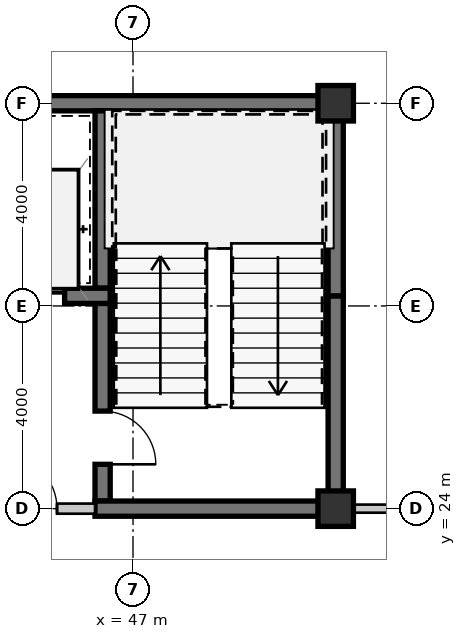
"""IFC4 building model, lengths in metres.
Left out: names, types, materials, properties, quantities, classifications, styles, units other than length and angle.
Written with IfcOpenShell. Run it as: python <this file> out.ifc"""

import sys

from ifc_helpers import new_model, si_unit, direction, frame, frame_2d, origin, origin_2d, place, context, subcontext, project, spatial, rectangle, extrude, source, transform, mapped, element, fill, save


model = new_model("IFC4")
c1 = context("Model", 3, precision=1e-05, world=origin(), true_north=direction((0.0, 1.0)))
c2 = subcontext(c1, "Body", "Model", "MODEL_VIEW")
j1 = project(units=[si_unit("LENGTHUNIT", "METRE"), si_unit("PLANEANGLEUNIT", "RADIAN")], contexts=[c1])
p1 = place(None, origin())
s1 = spatial("IfcSite", under=j1, at=p1, CompositionType="ELEMENT")
p2 = place(p1, origin())
s2 = spatial("IfcBuilding", under=s1, at=p2, CompositionType="ELEMENT")
p3 = place(p2, frame((0.0, 0.0, 74.55)))
s3 = spatial("IfcBuildingStorey", under=s2, at=p3, CompositionType="ELEMENT", Elevation=74.55)
m1 = source(origin(), c2, "Body", "SweptSolid", [
    extrude(rectangle(XDim=0.7, YDim=0.7, at=origin_2d()), origin(), (0.0, 0.0, 1.0), 3.15),
])
for number, where, z_axis, x_axis in (
    (1, (51.0, 24.0, 0.0), (0.0, 0.0, 1.0), (1.0, 0.0, 0.0)),
    (2, (51.0, 32.0, 0.0), (0.0, 0.0, 1.0), (1.0, 0.0, 0.0)),
):
    element("IfcColumn", number, at=place(p3, frame(where, z_axis=z_axis, x_axis=x_axis)), inside=s3, PredefinedType="COLUMN", context=c2, shape_type="MappedRepresentation", body=[
        mapped(m1, transform((0.0, 0.0, 0.0), scale=1.0)),
    ])
m2 = source(origin(), c2, "Body", "SweptSolid", [
    extrude(rectangle(XDim=11.95, YDim=0.3, at=frame_2d((5.975, 0.0))), origin(), (0.0, 0.0, 1.0), 2.93),
])
p4 = place(p3, frame((39.2, 32.0, 0.0), z_axis=(0.0, 0.0, 1.0), x_axis=(1.0, 0.0, 0.0)))
e3 = element("IfcWall", 3, at=p4, inside=s3, PredefinedType="SHEAR", context=c2, shape_type="MappedRepresentation", body=[
    mapped(m2, transform((0.0, 0.0, 0.0), scale=1.0)),
])
m3 = source(origin(), c2, "Body", "SweptSolid", [
    extrude(rectangle(XDim=4.05, YDim=0.3, at=frame_2d((2.025, 0.0))), origin(), (0.0, 0.0, 1.0), 2.93),
])
p5 = place(p3, frame((51.0, 24.15, 0.0), z_axis=(0.0, 0.0, 1.0), x_axis=(0.0, 1.0, 0.0)))
e4 = element("IfcWall", 4, at=p5, inside=s3, PredefinedType="SHEAR", context=c2, shape_type="MappedRepresentation", body=[
    mapped(m3, transform((0.0, 0.0, 0.0), scale=1.0)),
])
m4 = source(origin(), c2, "Body", "SweptSolid", [
    extrude(rectangle(XDim=3.65, YDim=0.3, at=frame_2d((1.825, 0.0))), origin(), (0.0, 0.0, 1.0), 2.93),
])
p6 = place(p3, frame((51.0, 28.2, 0.0), z_axis=(0.0, 0.0, 1.0), x_axis=(0.0, 1.0, 0.0)))
e5 = element("IfcWall", 5, at=p6, inside=s3, PredefinedType="SHEAR", context=c2, shape_type="MappedRepresentation", body=[
    mapped(m4, transform((0.0, 0.0, 0.0), scale=1.0)),
])
m5 = source(origin(), c2, "Body", "SweptSolid", [
    extrude(rectangle(XDim=3.5, YDim=0.3, at=frame_2d((1.75, 0.0))), origin(), (0.0, 0.0, 1.0), 2.93),
])
p7 = place(p3, frame((46.4, 31.85, 0.0), z_axis=(0.0, 0.0, 1.0), x_axis=(0.0, -1.0, 0.0)))
e6 = element("IfcWall", 6, at=p7, inside=s3, PredefinedType="SHEAR", context=c2, shape_type="MappedRepresentation", body=[
    mapped(m5, transform((0.0, 0.0, 0.0), scale=1.0)),
])
m6 = source(origin(), c2, "Body", "SweptSolid", [
    extrude(rectangle(XDim=3.9, YDim=0.3, at=frame_2d((1.95, 0.0))), origin(), (0.0, 0.0, 1.0), 2.93),
])
p8 = place(p3, frame((46.4, 28.05, 0.0), z_axis=(0.0, 0.0, 1.0), x_axis=(0.0, -1.0, 0.0)))
e7 = element("IfcWall", 7, at=p8, inside=s3, PredefinedType="SHEAR", context=c2, shape_type="MappedRepresentation", body=[
    mapped(m6, transform((0.0, 0.0, 0.0), scale=1.0)),
])
m7 = source(origin(), c2, "Body", "SweptSolid", [
    extrude(rectangle(XDim=1.05, YDim=2.1, at=frame_2d((0.525, 1.05))), frame((0.0, 0.16, 0.0), z_axis=(0.0, -1.0, 0.0), x_axis=(1.0, 0.0, 0.0)), (0.0, 0.0, 1.0), 0.32),
])
p9 = place(p8, frame((2.125, 0.0, 0.0)))
e8 = element("IfcOpeningElement", 8, at=p9, cuts=e7, PredefinedType="OPENING", context=c2, shape_type="MappedRepresentation", body=[
    mapped(m7, transform((0.0, 0.0, 0.0), scale=1.0)),
])
m8 = source(origin(), c2, "Body", "SweptSolid", [
    extrude(rectangle(XDim=4.9, YDim=0.3, at=frame_2d((2.45, 0.0))), origin(), (0.0, 0.0, 1.0), 2.93),
])
p10 = place(p3, frame((46.25, 24.0, 0.0), z_axis=(0.0, 0.0, 1.0), x_axis=(1.0, 0.0, 0.0)))
e9 = element("IfcWall", 9, at=p10, inside=s3, PredefinedType="SHEAR", context=c2, shape_type="MappedRepresentation", body=[
    mapped(m8, transform((0.0, 0.0, 0.0), scale=1.0)),
])
m9 = source(origin(), c2, "Body", "SweptSolid", [
    extrude(rectangle(XDim=2.9, YDim=0.3, at=frame_2d((1.45, 0.0))), origin(), (0.0, 0.0, 1.0), 2.93),
])
p11 = place(p3, frame((43.65, 28.2, 0.0), z_axis=(0.0, 0.0, 1.0), x_axis=(1.0, 0.0, 0.0)))
e10 = element("IfcWall", 10, at=p11, inside=s3, PredefinedType="SHEAR", context=c2, shape_type="MappedRepresentation", body=[
    mapped(m9, transform((0.0, 0.0, 0.0), scale=1.0)),
])
m10 = source(origin(), c2, "Body", "SweptSolid", [
    extrude(rectangle(XDim=1.1, YDim=2.15, at=frame_2d((0.55, 1.075))), frame((0.0, 0.16, 0.0), z_axis=(0.0, -1.0, 0.0), x_axis=(1.0, 0.0, 0.0)), (0.0, 0.0, 1.0), 0.32),
])
p12 = place(p11, frame((0.9, 0.0, 0.0)))
e11 = element("IfcOpeningElement", 11, at=p12, cuts=e10, PredefinedType="OPENING", context=c2, shape_type="MappedRepresentation", body=[
    mapped(m10, transform((0.0, 0.0, 0.0), scale=1.0)),
])
m11 = source(origin(), c2, "Body", "SweptSolid", [
    extrude(rectangle(XDim=2.7, YDim=0.2, at=frame_2d((1.35, 0.0))), origin(), (0.0, 0.0, 1.0), 2.397),
])
p13 = place(p3, frame((43.55, 24.0, 0.0), z_axis=(0.0, 0.0, 1.0), x_axis=(1.0, 0.0, 0.0)))
e12 = element("IfcWall", 12, at=p13, inside=s3, PredefinedType="SOLIDWALL", context=c2, shape_type="MappedRepresentation", body=[
    mapped(m11, transform((0.0, 0.0, 0.0), scale=1.0)),
])
m12 = source(origin(), c2, "Body", "SweptSolid", [
    extrude(rectangle(XDim=1.05, YDim=2.1, at=frame_2d((0.525, 1.05))), frame((0.0, 0.11, 0.0), z_axis=(0.0, -1.0, 0.0), x_axis=(1.0, 0.0, 0.0)), (0.0, 0.0, 1.0), 0.22),
])
p14 = place(p13, frame((0.9, 0.0, 0.0)))
e13 = element("IfcOpeningElement", 13, at=p14, cuts=e12, PredefinedType="OPENING", context=c2, shape_type="MappedRepresentation", body=[
    mapped(m12, transform((0.0, 0.0, 0.0), scale=1.0)),
])
m13 = source(origin(), c2, "Body", "SweptSolid", [
    extrude(rectangle(XDim=1.155, YDim=0.16, at=frame_2d((0.577, 0.0))), origin(), (0.0, 0.0, 1.0), 2.328),
])
p15 = place(p3, frame((51.15, 24.0, 0.0), z_axis=(0.0, 0.0, 1.0), x_axis=(1.0, 0.0, 0.0)))
e14 = element("IfcWall", 14, at=p15, inside=s3, PredefinedType="PARTITIONING", context=c2, shape_type="MappedRepresentation", body=[
    mapped(m13, transform((0.0, 0.0, 0.0), scale=1.0)),
])
m14 = source(origin(), c2, "Body", "SweptSolid", [
    extrude(rectangle(XDim=1.05, YDim=2.1, at=frame_2d((0.525, 1.05))), frame((0.0, 0.025, 0.0), z_axis=(0.0, -1.0, 0.0), x_axis=(1.0, 0.0, 0.0)), (0.0, 0.0, 1.0), 0.05),
])
p16 = place(p9, origin())
e15 = element("IfcDoor", 15, at=p16, inside=s3, OperationType="SINGLE_SWING_RIGHT", PredefinedType="DOOR", context=c2, shape_type="MappedRepresentation", body=[
    mapped(m14, transform((0.0, 0.0, 0.0), scale=1.0)),
])
fill(e8, e15)
m15 = source(origin(), c2, "Body", "SweptSolid", [
    extrude(rectangle(XDim=1.1, YDim=2.15, at=frame_2d((0.55, 1.075))), frame((0.0, 0.025, 0.0), z_axis=(0.0, -1.0, 0.0), x_axis=(1.0, 0.0, 0.0)), (0.0, 0.0, 1.0), 0.05),
])
p17 = place(p12, origin())
e16 = element("IfcDoor", 16, at=p17, inside=s3, OperationType="SLIDING_TO_LEFT", PredefinedType="DOOR", context=c2, shape_type="MappedRepresentation", body=[
    mapped(m15, transform((0.0, 0.0, 0.0), scale=1.0)),
])
fill(e11, e16)
p18 = place(p14, origin())
e17 = element("IfcDoor", 17, at=p18, inside=s3, OperationType="SINGLE_SWING_LEFT", PredefinedType="DOOR", context=c2, shape_type="MappedRepresentation", body=[
    mapped(m14, transform((0.0, 0.0, 0.0), scale=1.0)),
])
fill(e13, e17)
save(model, sys.argv[1])
